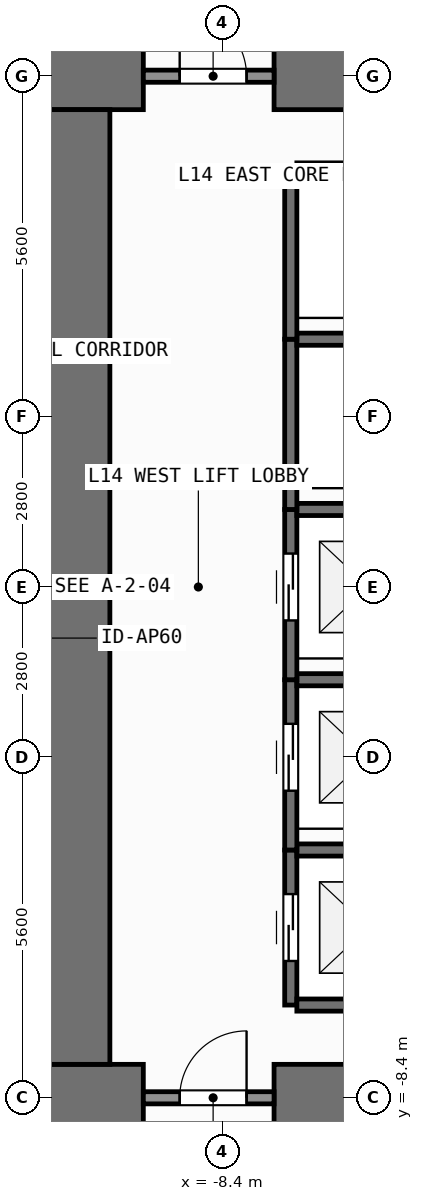
"""IFC4 building model, lengths in metres.
Left out: names, types, materials, properties, quantities, classifications, styles, units other than length and angle.
Written with IfcOpenShell. Run it as: python <this file> out.ifc"""

import sys

from ifc_helpers import new_model, si_unit, direction, frame, frame_2d, origin, place, context, subcontext, project, spatial, rectangle, extrude, element, fill, save


model = new_model("IFC4")
c1 = context("Model", 3, precision=1e-05, world=origin(), true_north=direction((0.0, 1.0)))
c2 = subcontext(c1, "Body", "Model", "MODEL_VIEW")
j1 = project(units=[si_unit("LENGTHUNIT", "METRE"), si_unit("PLANEANGLEUNIT", "RADIAN")], contexts=[c1])
p1 = place(None, origin())
s1 = spatial("IfcSite", under=j1, at=p1, CompositionType="ELEMENT")
p2 = place(p1, origin())
s2 = spatial("IfcBuilding", under=s1, at=p2, CompositionType="ELEMENT")
p3 = place(p2, frame((0.0, 0.0, 54.0)))
s3 = spatial("IfcBuildingStorey", under=s2, at=p3, CompositionType="ELEMENT", Elevation=54.0)
p4 = place(p3, frame((-11.35, -8.4, 0.0), z_axis=(0.0, 0.0, 1.0), x_axis=(1.0, 0.0, 0.0)))
e1 = element("IfcWall", 1, at=p4, inside=s3, PredefinedType="SHEAR", context=c2, shape_type="SweptSolid", body=[
    extrude(rectangle(XDim=1.65, YDim=1.1, at=frame_2d((0.825, 0.0))), origin(), (0.0, 0.0, 1.0), 3.9),
])
p5 = place(p3, frame((-7.55, -8.4, 0.0), z_axis=(0.0, 0.0, 1.0), x_axis=(1.0, 0.0, 0.0)))
e2 = element("IfcWall", 2, at=p5, inside=s3, PredefinedType="SHEAR", context=c2, shape_type="SweptSolid", body=[
    extrude(rectangle(XDim=3.35, YDim=1.1, at=frame_2d((1.675, 0.0))), origin(), (0.0, 0.0, 1.0), 3.9),
])
p6 = place(p3, frame((-11.35, 8.4, 0.0), z_axis=(0.0, 0.0, 1.0), x_axis=(1.0, 0.0, 0.0)))
e3 = element("IfcWall", 3, at=p6, inside=s3, PredefinedType="SHEAR", context=c2, shape_type="SweptSolid", body=[
    extrude(rectangle(XDim=1.65, YDim=1.1, at=frame_2d((0.825, 0.0))), origin(), (0.0, 0.0, 1.0), 3.9),
])
p7 = place(p3, frame((-7.55, 8.4, 0.0), z_axis=(0.0, 0.0, 1.0), x_axis=(1.0, 0.0, 0.0)))
e4 = element("IfcWall", 4, at=p7, inside=s3, PredefinedType="SHEAR", context=c2, shape_type="SweptSolid", body=[
    extrude(rectangle(XDim=16.5, YDim=1.1, at=frame_2d((8.25, 0.0))), origin(), (0.0, 0.0, 1.0), 3.9),
])
p8 = place(p3, frame((-10.8, -7.85, 0.0), z_axis=(0.0, 0.0, 1.0), x_axis=(0.0, 1.0, 0.0)))
e5 = element("IfcWall", 5, at=p8, inside=s3, PredefinedType="SHEAR", context=c2, shape_type="SweptSolid", body=[
    extrude(rectangle(XDim=15.7, YDim=1.1, at=frame_2d((7.85, 0.0))), origin(), (0.0, 0.0, 1.0), 3.9),
])
p9 = place(p3, frame((-7.275, -6.875, 0.0), z_axis=(0.0, 0.0, 1.0), x_axis=(0.0, 1.0, 0.0)))
e6 = element("IfcWall", 6, at=p9, inside=s3, PredefinedType="SHEAR", context=c2, shape_type="SweptSolid", body=[
    extrude(rectangle(XDim=2.55, YDim=0.2, at=frame_2d((1.275, 0.0))), origin(), (0.0, 0.0, 1.0), 3.68),
])
p10 = place(p9, frame((0.725, 0.0, 0.0)))
e7 = element("IfcOpeningElement", 7, at=p10, cuts=e6, PredefinedType="OPENING", context=c2, shape_type="SweptSolid", body=[
    extrude(rectangle(XDim=1.1, YDim=2.2, at=frame_2d((0.55, 1.1))), frame((0.0, 0.11, 0.0), z_axis=(0.0, -1.0, 0.0), x_axis=(1.0, 0.0, 0.0)), (0.0, 0.0, 1.0), 0.22),
])
for number, where, z_axis, x_axis in (
    (8, (-7.175, -6.875, 0.0), (0.0, 0.0, 1.0), (1.0, 0.0, 0.0)),
    (9, (-7.175, -4.325, 0.0), (0.0, 0.0, 1.0), (1.0, 0.0, 0.0)),
):
    element("IfcWall", number, at=place(p3, frame(where, z_axis=z_axis, x_axis=x_axis)), inside=s3, PredefinedType="SHEAR", context=c2, shape_type="SweptSolid", body=[
        extrude(rectangle(XDim=2.35, YDim=0.2, at=frame_2d((1.175, 0.0))), origin(), (0.0, 0.0, 1.0), 3.68),
    ])
p11 = place(p3, frame((-7.275, -4.325, 0.0), z_axis=(0.0, 0.0, 1.0), x_axis=(0.0, 1.0, 0.0)))
e10 = element("IfcWall", 10, at=p11, inside=s3, PredefinedType="SHEAR", context=c2, shape_type="SweptSolid", body=[
    extrude(rectangle(XDim=2.8, YDim=0.2, at=frame_2d((1.4, 0.0))), origin(), (0.0, 0.0, 1.0), 3.68),
])
p12 = place(p11, frame((0.975, 0.0, 0.0)))
e11 = element("IfcOpeningElement", 11, at=p12, cuts=e10, PredefinedType="OPENING", context=c2, shape_type="SweptSolid", body=[
    extrude(rectangle(XDim=1.1, YDim=2.2, at=frame_2d((0.55, 1.1))), frame((0.0, 0.11, 0.0), z_axis=(0.0, -1.0, 0.0), x_axis=(1.0, 0.0, 0.0)), (0.0, 0.0, 1.0), 0.22),
])
p13 = place(p3, frame((-7.175, -1.525, 0.0), z_axis=(0.0, 0.0, 1.0), x_axis=(1.0, 0.0, 0.0)))
e12 = element("IfcWall", 12, at=p13, inside=s3, PredefinedType="SHEAR", context=c2, shape_type="SweptSolid", body=[
    extrude(rectangle(XDim=2.35, YDim=0.2, at=frame_2d((1.175, 0.0))), origin(), (0.0, 0.0, 1.0), 3.68),
])
p14 = place(p3, frame((-7.275, -1.525, 0.0), z_axis=(0.0, 0.0, 1.0), x_axis=(0.0, 1.0, 0.0)))
e13 = element("IfcWall", 13, at=p14, inside=s3, PredefinedType="SHEAR", context=c2, shape_type="SweptSolid", body=[
    extrude(rectangle(XDim=2.8, YDim=0.2, at=frame_2d((1.4, 0.0))), origin(), (0.0, 0.0, 1.0), 3.68),
])
p15 = place(p14, frame((0.975, 0.0, 0.0)))
e14 = element("IfcOpeningElement", 14, at=p15, cuts=e13, PredefinedType="OPENING", context=c2, shape_type="SweptSolid", body=[
    extrude(rectangle(XDim=1.1, YDim=2.2, at=frame_2d((0.55, 1.1))), frame((0.0, 0.11, 0.0), z_axis=(0.0, -1.0, 0.0), x_axis=(1.0, 0.0, 0.0)), (0.0, 0.0, 1.0), 0.22),
])
p16 = place(p3, frame((-7.175, 1.275, 0.0), z_axis=(0.0, 0.0, 1.0), x_axis=(1.0, 0.0, 0.0)))
e15 = element("IfcWall", 15, at=p16, inside=s3, PredefinedType="SHEAR", context=c2, shape_type="SweptSolid", body=[
    extrude(rectangle(XDim=2.35, YDim=0.2, at=frame_2d((1.175, 0.0))), origin(), (0.0, 0.0, 1.0), 3.68),
])
p17 = place(p3, frame((-7.275, 1.275, 0.0), z_axis=(0.0, 0.0, 1.0), x_axis=(0.0, 1.0, 0.0)))
e16 = element("IfcWall", 16, at=p17, inside=s3, PredefinedType="SHEAR", context=c2, shape_type="SweptSolid", body=[
    extrude(rectangle(XDim=2.8, YDim=0.2, at=frame_2d((1.4, 0.0))), origin(), (0.0, 0.0, 1.0), 3.68),
])
p18 = place(p3, frame((-7.175, 4.075, 0.0), z_axis=(0.0, 0.0, 1.0), x_axis=(1.0, 0.0, 0.0)))
e17 = element("IfcWall", 17, at=p18, inside=s3, PredefinedType="SHEAR", context=c2, shape_type="SweptSolid", body=[
    extrude(rectangle(XDim=2.35, YDim=0.2, at=frame_2d((1.175, 0.0))), origin(), (0.0, 0.0, 1.0), 3.68),
])
p19 = place(p3, frame((-7.275, 4.075, 0.0), z_axis=(0.0, 0.0, 1.0), x_axis=(0.0, 1.0, 0.0)))
e18 = element("IfcWall", 18, at=p19, inside=s3, PredefinedType="SHEAR", context=c2, shape_type="SweptSolid", body=[
    extrude(rectangle(XDim=2.8, YDim=0.2, at=frame_2d((1.4, 0.0))), origin(), (0.0, 0.0, 1.0), 3.68),
])
p20 = place(p3, frame((-7.175, 6.875, 0.0), z_axis=(0.0, 0.0, 1.0), x_axis=(1.0, 0.0, 0.0)))
e19 = element("IfcWall", 19, at=p20, inside=s3, PredefinedType="SHEAR", context=c2, shape_type="SweptSolid", body=[
    extrude(rectangle(XDim=2.35, YDim=0.2, at=frame_2d((1.175, 0.0))), origin(), (0.0, 0.0, 1.0), 3.68),
])
p21 = place(p3, frame((-9.7, -8.4, 0.0), z_axis=(0.0, 0.0, 1.0), x_axis=(1.0, 0.0, 0.0)))
e20 = element("IfcWall", 20, at=p21, inside=s3, PredefinedType="SOLIDWALL", context=c2, shape_type="SweptSolid", body=[
    extrude(rectangle(XDim=2.15, YDim=0.2, at=frame_2d((1.075, 0.0))), origin(), (0.0, 0.0, 1.0), 2.72),
])
p22 = place(p21, frame((0.598, 0.0, 0.0)))
e21 = element("IfcOpeningElement", 21, at=p22, cuts=e20, PredefinedType="OPENING", context=c2, shape_type="SweptSolid", body=[
    extrude(rectangle(XDim=1.1, YDim=2.15, at=frame_2d((0.55, 1.075))), frame((0.0, 0.11, 0.0), z_axis=(0.0, -1.0, 0.0), x_axis=(1.0, 0.0, 0.0)), (0.0, 0.0, 1.0), 0.22),
])
p23 = place(p3, frame((-9.7, 8.4, 0.0), z_axis=(0.0, 0.0, 1.0), x_axis=(1.0, 0.0, 0.0)))
e22 = element("IfcWall", 22, at=p23, inside=s3, PredefinedType="SOLIDWALL", context=c2, shape_type="SweptSolid", body=[
    extrude(rectangle(XDim=2.15, YDim=0.2, at=frame_2d((1.075, 0.0))), origin(), (0.0, 0.0, 1.0), 2.72),
])
p24 = place(p23, frame((0.598, 0.0, 0.0)))
e23 = element("IfcOpeningElement", 23, at=p24, cuts=e22, PredefinedType="OPENING", context=c2, shape_type="SweptSolid", body=[
    extrude(rectangle(XDim=1.1, YDim=2.15, at=frame_2d((0.55, 1.075))), frame((0.0, 0.11, 0.0), z_axis=(0.0, -1.0, 0.0), x_axis=(1.0, 0.0, 0.0)), (0.0, 0.0, 1.0), 0.22),
])
p25 = place(p10, origin())
e24 = element("IfcDoor", 24, at=p25, inside=s3, OperationType="SLIDING_TO_LEFT", PredefinedType="DOOR", context=c2, shape_type="SweptSolid", body=[
    extrude(rectangle(XDim=1.1, YDim=2.2, at=frame_2d((0.55, 1.1))), frame((0.0, 0.025, 0.0), z_axis=(0.0, -1.0, 0.0), x_axis=(1.0, 0.0, 0.0)), (0.0, 0.0, 1.0), 0.05),
])
fill(e7, e24)
p26 = place(p12, origin())
e25 = element("IfcDoor", 25, at=p26, inside=s3, OperationType="SLIDING_TO_LEFT", PredefinedType="DOOR", context=c2, shape_type="SweptSolid", body=[
    extrude(rectangle(XDim=1.1, YDim=2.2, at=frame_2d((0.55, 1.1))), frame((0.0, 0.025, 0.0), z_axis=(0.0, -1.0, 0.0), x_axis=(1.0, 0.0, 0.0)), (0.0, 0.0, 1.0), 0.05),
])
fill(e11, e25)
p27 = place(p15, origin())
e26 = element("IfcDoor", 26, at=p27, inside=s3, OperationType="SLIDING_TO_LEFT", PredefinedType="DOOR", context=c2, shape_type="SweptSolid", body=[
    extrude(rectangle(XDim=1.1, YDim=2.2, at=frame_2d((0.55, 1.1))), frame((0.0, 0.025, 0.0), z_axis=(0.0, -1.0, 0.0), x_axis=(1.0, 0.0, 0.0)), (0.0, 0.0, 1.0), 0.05),
])
fill(e14, e26)
p28 = place(p22, origin())
e27 = element("IfcDoor", 27, at=p28, inside=s3, OperationType="SINGLE_SWING_RIGHT", PredefinedType="DOOR", context=c2, shape_type="SweptSolid", body=[
    extrude(rectangle(XDim=1.1, YDim=2.15, at=frame_2d((0.55, 1.075))), frame((0.0, 0.025, 0.0), z_axis=(0.0, -1.0, 0.0), x_axis=(1.0, 0.0, 0.0)), (0.0, 0.0, 1.0), 0.05),
])
fill(e21, e27)
p29 = place(p24, origin())
e28 = element("IfcDoor", 28, at=p29, inside=s3, OperationType="SINGLE_SWING_LEFT", PredefinedType="DOOR", context=c2, shape_type="SweptSolid", body=[
    extrude(rectangle(XDim=1.1, YDim=2.15, at=frame_2d((0.55, 1.075))), frame((0.0, 0.025, 0.0), z_axis=(0.0, -1.0, 0.0), x_axis=(1.0, 0.0, 0.0)), (0.0, 0.0, 1.0), 0.05),
])
fill(e23, e28)
save(model, sys.argv[1])
